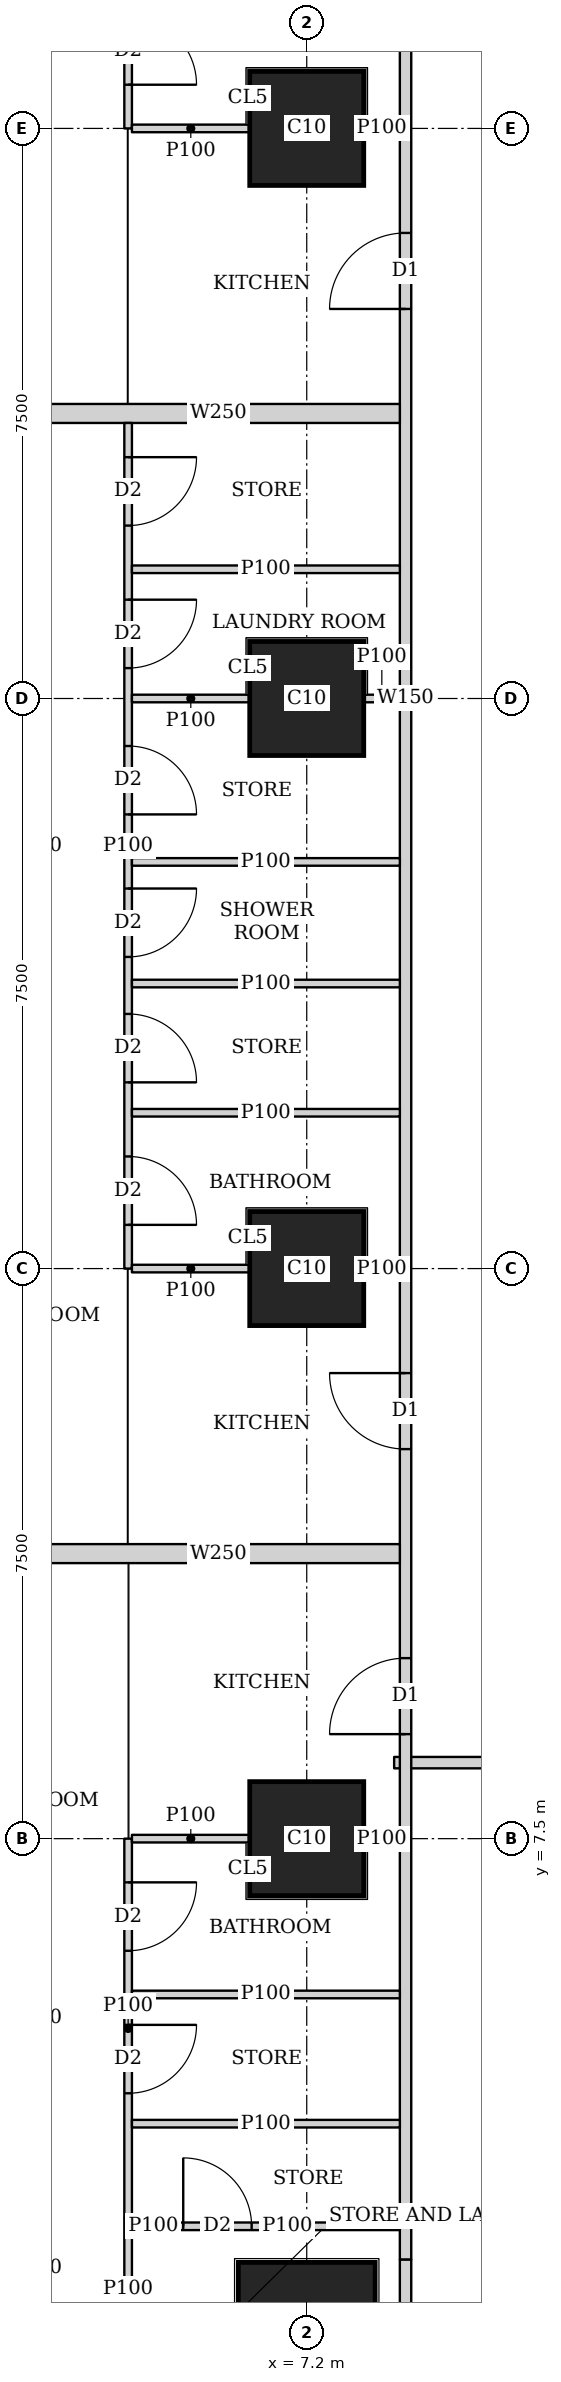
"""IFC4 building model, lengths in metres.
Left out: names, types, materials, properties, quantities, classifications, styles, units other than length and angle.
Written with IfcOpenShell. Run it as: python <this file> out.ifc"""

import sys

from ifc_helpers import new_model, si_unit, direction, frame, frame_2d, origin, origin_2d, place, context, subcontext, project, spatial, rectangle, extrude, element, fill, save


model = new_model("IFC4")
c1 = context("Model", 3, precision=1e-05, world=origin(), true_north=direction((0.0, 1.0)))
c2 = subcontext(c1, "Body", "Model", "MODEL_VIEW")
j1 = project(units=[si_unit("LENGTHUNIT", "METRE"), si_unit("PLANEANGLEUNIT", "RADIAN")], contexts=[c1])
p1 = place(None, origin())
s1 = spatial("IfcSite", under=j1, at=p1, CompositionType="ELEMENT")
p2 = place(p1, origin())
s2 = spatial("IfcBuilding", under=s1, at=p2, CompositionType="ELEMENT")
p3 = place(p2, frame((0.0, 0.0, 139.55)))
s3 = spatial("IfcBuildingStorey", under=s2, at=p3, CompositionType="ELEMENT", Elevation=139.55)
p4 = place(p3, frame((7.2, 1.025, 0.0), z_axis=(0.0, 0.0, 1.0), x_axis=(1.0, 0.0, 0.0)))
e1 = element("IfcColumn", 1, at=p4, inside=s3, PredefinedType="COLUMN", context=c2, shape_type="SweptSolid", body=[
    extrude(rectangle(XDim=1.8, YDim=1.8, at=origin_2d()), origin(), (0.0, 0.0, 1.0), 3.75),
])
for number, where, z_axis, x_axis in (
    (2, (7.2, 7.5, 0.0), (0.0, 0.0, 1.0), (1.0, 0.0, 0.0)),
    (3, (7.2, 15.0, 0.0), (0.0, 0.0, 1.0), (1.0, 0.0, 0.0)),
    (4, (7.2, 22.5, 0.0), (0.0, 0.0, 1.0), (1.0, 0.0, 0.0)),
    (5, (7.2, 30.0, 0.0), (0.0, 0.0, 1.0), (1.0, 0.0, 0.0)),
):
    element("IfcColumn", number, at=place(p3, frame(where, z_axis=z_axis, x_axis=x_axis)), inside=s3, PredefinedType="COLUMN", context=c2, shape_type="SweptSolid", body=[
        extrude(rectangle(XDim=1.5, YDim=1.5, at=origin_2d()), origin(), (0.0, 0.0, 1.0), 3.75),
    ])
p5 = place(p3, frame((8.5, 0.159, 0.0), z_axis=(0.0, 0.0, 1.0), x_axis=(0.0, 1.0, 0.0)))
e6 = element("IfcWall", 6, at=p5, inside=s3, PredefinedType="SOLIDWALL", context=c2, shape_type="SweptSolid", body=[
    extrude(rectangle(XDim=1.805, YDim=0.15, at=frame_2d((0.903, 0.0))), origin(), (0.0, 0.0, 1.0), 2.1),
])
p6 = place(p3, frame((8.5, 1.964, 0.0), z_axis=(0.0, 0.0, 1.0), x_axis=(0.0, 1.0, 0.0)))
e7 = element("IfcWall", 7, at=p6, inside=s3, PredefinedType="SOLIDWALL", context=c2, shape_type="SweptSolid", body=[
    extrude(rectangle(XDim=41.097, YDim=0.15, at=frame_2d((20.548, 0.0))), origin(), (0.0, 0.0, 1.0), 3.5),
])
p7 = place(p6, frame((6.911, 0.0, 0.0)))
e8 = element("IfcOpeningElement", 8, at=p7, cuts=e7, PredefinedType="OPENING", context=c2, shape_type="SweptSolid", body=[
    extrude(rectangle(XDim=1.0, YDim=2.1, at=frame_2d((0.5, 1.05))), frame((0.0, 0.085, 0.0), z_axis=(0.0, -1.0, 0.0), x_axis=(1.0, 0.0, 0.0)), (0.0, 0.0, 1.0), 0.17),
])
p8 = place(p6, frame((10.661, 0.0, 0.0)))
e9 = element("IfcOpeningElement", 9, at=p8, cuts=e7, PredefinedType="OPENING", context=c2, shape_type="SweptSolid", body=[
    extrude(rectangle(XDim=1.0, YDim=2.1, at=frame_2d((0.5, 1.05))), frame((0.0, 0.085, 0.0), z_axis=(0.0, -1.0, 0.0), x_axis=(1.0, 0.0, 0.0)), (0.0, 0.0, 1.0), 0.17),
])
p9 = place(p6, frame((25.661, 0.0, 0.0)))
e10 = element("IfcOpeningElement", 10, at=p9, cuts=e7, PredefinedType="OPENING", context=c2, shape_type="SweptSolid", body=[
    extrude(rectangle(XDim=1.0, YDim=2.1, at=frame_2d((0.5, 1.05))), frame((0.0, 0.085, 0.0), z_axis=(0.0, -1.0, 0.0), x_axis=(1.0, 0.0, 0.0)), (0.0, 0.0, 1.0), 0.17),
])
p10 = place(p6, frame((33.161, 0.0, 0.0)))
e11 = element("IfcOpeningElement", 11, at=p10, cuts=e7, PredefinedType="OPENING", context=c2, shape_type="SweptSolid", body=[
    extrude(rectangle(XDim=1.0, YDim=2.1, at=frame_2d((0.5, 1.05))), frame((0.0, 0.085, 0.0), z_axis=(0.0, -1.0, 0.0), x_axis=(1.0, 0.0, 0.0)), (0.0, 0.0, 1.0), 0.17),
])
p11 = place(p3, frame((40.053, 8.5, 0.0), z_axis=(0.0, 0.0, 1.0), x_axis=(-1.0, 0.0, 0.0)))
e12 = element("IfcWall", 12, at=p11, inside=s3, PredefinedType="SOLIDWALL", context=c2, shape_type="SweptSolid", body=[
    extrude(rectangle(XDim=31.703, YDim=0.15, at=frame_2d((15.852, 0.0))), origin(), (0.0, 0.0, 1.0), 3.5),
])
p12 = place(p11, frame((28.103, 0.0, 0.0)))
e13 = element("IfcOpeningElement", 13, at=p12, cuts=e12, PredefinedType="OPENING", context=c2, shape_type="SweptSolid", body=[
    extrude(rectangle(XDim=1.0, YDim=2.1, at=frame_2d((0.5, 1.05))), frame((0.0, 0.085, 0.0), z_axis=(0.0, -1.0, 0.0), x_axis=(1.0, 0.0, 0.0)), (0.0, 0.0, 1.0), 0.17),
])
p13 = place(p11, frame((19.853, 0.0, 0.0)))
e14 = element("IfcOpeningElement", 14, at=p13, cuts=e12, PredefinedType="OPENING", context=c2, shape_type="SweptSolid", body=[
    extrude(rectangle(XDim=1.0, YDim=2.1, at=frame_2d((0.5, 1.05))), frame((0.0, 0.085, 0.0), z_axis=(0.0, -1.0, 0.0), x_axis=(1.0, 0.0, 0.0)), (0.0, 0.0, 1.0), 0.17),
])
p14 = place(p11, frame((5.514, 0.0, 0.0)))
e15 = element("IfcOpeningElement", 15, at=p14, cuts=e12, PredefinedType="OPENING", context=c2, shape_type="SweptSolid", body=[
    extrude(rectangle(XDim=1.0, YDim=2.1, at=frame_2d((0.5, 1.05))), frame((0.0, 0.085, 0.0), z_axis=(0.0, -1.0, 0.0), x_axis=(1.0, 0.0, 0.0)), (0.0, 0.0, 1.0), 0.17),
])
p15 = place(p3, frame((4.85, 0.634, 0.0), z_axis=(0.0, 0.0, 1.0), x_axis=(0.0, 1.0, 0.0)))
e16 = element("IfcWall", 16, at=p15, inside=s3, PredefinedType="PARTITIONING", context=c2, shape_type="SweptSolid", body=[
    extrude(rectangle(XDim=1.871, YDim=0.1, at=frame_2d((0.936, 0.0))), origin(), (0.0, 0.0, 1.0), 2.1),
])
p16 = place(p3, frame((4.85, 2.505, 0.0), z_axis=(0.0, 0.0, 1.0), x_axis=(0.0, 1.0, 0.0)))
e17 = element("IfcWall", 17, at=p16, inside=s3, PredefinedType="PARTITIONING", context=c2, shape_type="SweptSolid", body=[
    extrude(rectangle(XDim=4.995, YDim=0.1, at=frame_2d((2.498, 0.0))), origin(), (0.0, 0.0, 1.0), 3.5),
])
p17 = place(p16, frame((3.52, 0.0, 0.0)))
e18 = element("IfcOpeningElement", 18, at=p17, cuts=e17, PredefinedType="OPENING", context=c2, shape_type="SweptSolid", body=[
    extrude(rectangle(XDim=0.9, YDim=2.1, at=frame_2d((0.45, 1.05))), frame((0.0, 0.06, 0.0), z_axis=(0.0, -1.0, 0.0), x_axis=(1.0, 0.0, 0.0)), (0.0, 0.0, 1.0), 0.12),
])
p18 = place(p16, frame((1.645, 0.0, 0.0)))
e19 = element("IfcOpeningElement", 19, at=p18, cuts=e17, PredefinedType="OPENING", context=c2, shape_type="SweptSolid", body=[
    extrude(rectangle(XDim=0.9, YDim=2.1, at=frame_2d((0.45, 1.05))), frame((0.0, 0.06, 0.0), z_axis=(0.0, -1.0, 0.0), x_axis=(1.0, 0.0, 0.0)), (0.0, 0.0, 1.0), 0.12),
])
p19 = place(p3, frame((4.9, 3.75, 0.0), z_axis=(0.0, 0.0, 1.0), x_axis=(1.0, 0.0, 0.0)))
e20 = element("IfcWall", 20, at=p19, inside=s3, PredefinedType="PARTITIONING", context=c2, shape_type="SweptSolid", body=[
    extrude(rectangle(XDim=3.525, YDim=0.1, at=frame_2d((1.763, 0.0))), origin(), (0.0, 0.0, 1.0), 3.5),
])
p20 = place(p3, frame((4.9, 7.5, 0.0), z_axis=(0.0, 0.0, 1.0), x_axis=(1.0, 0.0, 0.0)))
e21 = element("IfcWall", 21, at=p20, inside=s3, PredefinedType="PARTITIONING", context=c2, shape_type="SweptSolid", body=[
    extrude(rectangle(XDim=1.549, YDim=0.1, at=frame_2d((0.774, 0.0))), origin(), (0.0, 0.0, 1.0), 3.5),
])
p21 = place(p3, frame((7.951, 7.5, 0.0), z_axis=(0.0, 0.0, 1.0), x_axis=(1.0, 0.0, 0.0)))
e22 = element("IfcWall", 22, at=p21, inside=s3, PredefinedType="PARTITIONING", context=c2, shape_type="SweptSolid", body=[
    extrude(rectangle(XDim=0.474, YDim=0.1, at=frame_2d((0.237, 0.0))), origin(), (0.0, 0.0, 1.0), 3.5),
])
p22 = place(p3, frame((4.9, 5.45, 0.0), z_axis=(0.0, 0.0, 1.0), x_axis=(1.0, 0.0, 0.0)))
e23 = element("IfcWall", 23, at=p22, inside=s3, PredefinedType="PARTITIONING", context=c2, shape_type="SweptSolid", body=[
    extrude(rectangle(XDim=3.525, YDim=0.1, at=frame_2d((1.763, 0.0))), origin(), (0.0, 0.0, 1.0), 3.5),
])
p23 = place(p3, frame((4.85, 15.0, 0.0), z_axis=(0.0, 0.0, 1.0), x_axis=(0.0, 1.0, 0.0)))
e24 = element("IfcWall", 24, at=p23, inside=s3, PredefinedType="PARTITIONING", context=c2, shape_type="SweptSolid", body=[
    extrude(rectangle(XDim=11.125, YDim=0.1, at=frame_2d((5.562, 0.0))), origin(), (0.0, 0.0, 1.0), 3.5),
])
p24 = place(p23, frame((0.575, 0.0, 0.0)))
e25 = element("IfcOpeningElement", 25, at=p24, cuts=e24, PredefinedType="OPENING", context=c2, shape_type="SweptSolid", body=[
    extrude(rectangle(XDim=0.9, YDim=2.1, at=frame_2d((0.45, 1.05))), frame((0.0, 0.06, 0.0), z_axis=(0.0, -1.0, 0.0), x_axis=(1.0, 0.0, 0.0)), (0.0, 0.0, 1.0), 0.12),
])
p25 = place(p23, frame((4.1, 0.0, 0.0)))
e26 = element("IfcOpeningElement", 26, at=p25, cuts=e24, PredefinedType="OPENING", context=c2, shape_type="SweptSolid", body=[
    extrude(rectangle(XDim=0.9, YDim=2.1, at=frame_2d((0.45, 1.05))), frame((0.0, 0.06, 0.0), z_axis=(0.0, -1.0, 0.0), x_axis=(1.0, 0.0, 0.0)), (0.0, 0.0, 1.0), 0.12),
])
p26 = place(p23, frame((7.9, 0.0, 0.0)))
e27 = element("IfcOpeningElement", 27, at=p26, cuts=e24, PredefinedType="OPENING", context=c2, shape_type="SweptSolid", body=[
    extrude(rectangle(XDim=0.9, YDim=2.1, at=frame_2d((0.45, 1.05))), frame((0.0, 0.06, 0.0), z_axis=(0.0, -1.0, 0.0), x_axis=(1.0, 0.0, 0.0)), (0.0, 0.0, 1.0), 0.12),
])
p27 = place(p23, frame((2.45, 0.0, 0.0)))
e28 = element("IfcOpeningElement", 28, at=p27, cuts=e24, PredefinedType="OPENING", context=c2, shape_type="SweptSolid", body=[
    extrude(rectangle(XDim=0.9, YDim=2.1, at=frame_2d((0.45, 1.05))), frame((0.0, 0.06, 0.0), z_axis=(0.0, -1.0, 0.0), x_axis=(1.0, 0.0, 0.0)), (0.0, 0.0, 1.0), 0.12),
])
p28 = place(p23, frame((5.975, 0.0, 0.0)))
e29 = element("IfcOpeningElement", 29, at=p28, cuts=e24, PredefinedType="OPENING", context=c2, shape_type="SweptSolid", body=[
    extrude(rectangle(XDim=0.9, YDim=2.1, at=frame_2d((0.45, 1.05))), frame((0.0, 0.06, 0.0), z_axis=(0.0, -1.0, 0.0), x_axis=(1.0, 0.0, 0.0)), (0.0, 0.0, 1.0), 0.12),
])
p29 = place(p23, frame((9.775, 0.0, 0.0)))
e30 = element("IfcOpeningElement", 30, at=p29, cuts=e24, PredefinedType="OPENING", context=c2, shape_type="SweptSolid", body=[
    extrude(rectangle(XDim=0.9, YDim=2.1, at=frame_2d((0.45, 1.05))), frame((0.0, 0.06, 0.0), z_axis=(0.0, -1.0, 0.0), x_axis=(1.0, 0.0, 0.0)), (0.0, 0.0, 1.0), 0.12),
])
p30 = place(p3, frame((4.9, 15.0, 0.0), z_axis=(0.0, 0.0, 1.0), x_axis=(1.0, 0.0, 0.0)))
e31 = element("IfcWall", 31, at=p30, inside=s3, PredefinedType="PARTITIONING", context=c2, shape_type="SweptSolid", body=[
    extrude(rectangle(XDim=1.549, YDim=0.1, at=frame_2d((0.774, 0.0))), origin(), (0.0, 0.0, 1.0), 3.5),
])
p31 = place(p3, frame((7.951, 15.0, 0.0), z_axis=(0.0, 0.0, 1.0), x_axis=(1.0, 0.0, 0.0)))
e32 = element("IfcWall", 32, at=p31, inside=s3, PredefinedType="PARTITIONING", context=c2, shape_type="SweptSolid", body=[
    extrude(rectangle(XDim=0.474, YDim=0.1, at=frame_2d((0.237, 0.0))), origin(), (0.0, 0.0, 1.0), 3.5),
])
p32 = place(p3, frame((4.9, 18.75, 0.0), z_axis=(0.0, 0.0, 1.0), x_axis=(1.0, 0.0, 0.0)))
e33 = element("IfcWall", 33, at=p32, inside=s3, PredefinedType="PARTITIONING", context=c2, shape_type="SweptSolid", body=[
    extrude(rectangle(XDim=3.525, YDim=0.1, at=frame_2d((1.763, 0.0))), origin(), (0.0, 0.0, 1.0), 3.5),
])
p33 = place(p3, frame((4.9, 22.5, 0.0), z_axis=(0.0, 0.0, 1.0), x_axis=(1.0, 0.0, 0.0)))
e34 = element("IfcWall", 34, at=p33, inside=s3, PredefinedType="PARTITIONING", context=c2, shape_type="SweptSolid", body=[
    extrude(rectangle(XDim=1.549, YDim=0.1, at=frame_2d((0.774, 0.0))), origin(), (0.0, 0.0, 1.0), 3.5),
])
p34 = place(p3, frame((7.951, 22.5, 0.0), z_axis=(0.0, 0.0, 1.0), x_axis=(1.0, 0.0, 0.0)))
e35 = element("IfcWall", 35, at=p34, inside=s3, PredefinedType="PARTITIONING", context=c2, shape_type="SweptSolid", body=[
    extrude(rectangle(XDim=0.474, YDim=0.1, at=frame_2d((0.237, 0.0))), origin(), (0.0, 0.0, 1.0), 3.5),
])
for number, where, z_axis, x_axis in (
    (36, (4.9, 17.05, 0.0), (0.0, 0.0, 1.0), (1.0, 0.0, 0.0)),
    (37, (4.9, 20.35, 0.0), (0.0, 0.0, 1.0), (1.0, 0.0, 0.0)),
    (38, (4.9, 24.2, 0.0), (0.0, 0.0, 1.0), (1.0, 0.0, 0.0)),
):
    element("IfcWall", number, at=place(p3, frame(where, z_axis=z_axis, x_axis=x_axis)), inside=s3, PredefinedType="PARTITIONING", context=c2, shape_type="SweptSolid", body=[
        extrude(rectangle(XDim=3.525, YDim=0.1, at=frame_2d((1.763, 0.0))), origin(), (0.0, 0.0, 1.0), 3.5),
    ])
p35 = place(p3, frame((3.65, 11.25, 0.0), z_axis=(0.0, 0.0, 1.0), x_axis=(1.0, 0.0, 0.0)))
e39 = element("IfcWall", 39, at=p35, inside=s3, PredefinedType="SOLIDWALL", context=c2, shape_type="SweptSolid", body=[
    extrude(rectangle(XDim=4.775, YDim=0.25, at=frame_2d((2.388, 0.0))), origin(), (0.0, 0.0, 1.0), 3.5),
])
p36 = place(p3, frame((4.85, 30.0, 0.0), z_axis=(0.0, 0.0, 1.0), x_axis=(0.0, 1.0, 0.0)))
e40 = element("IfcWall", 40, at=p36, inside=s3, PredefinedType="PARTITIONING", context=c2, shape_type="SweptSolid", body=[
    extrude(rectangle(XDim=3.625, YDim=0.1, at=frame_2d((1.812, 0.0))), origin(), (0.0, 0.0, 1.0), 3.5),
])
p37 = place(p36, frame((0.575, 0.0, 0.0)))
e41 = element("IfcOpeningElement", 41, at=p37, cuts=e40, PredefinedType="OPENING", context=c2, shape_type="SweptSolid", body=[
    extrude(rectangle(XDim=0.9, YDim=2.1, at=frame_2d((0.45, 1.05))), frame((0.0, 0.06, 0.0), z_axis=(0.0, -1.0, 0.0), x_axis=(1.0, 0.0, 0.0)), (0.0, 0.0, 1.0), 0.12),
])
p38 = place(p36, frame((2.45, 0.0, 0.0)))
e42 = element("IfcOpeningElement", 42, at=p38, cuts=e40, PredefinedType="OPENING", context=c2, shape_type="SweptSolid", body=[
    extrude(rectangle(XDim=0.9, YDim=2.1, at=frame_2d((0.45, 1.05))), frame((0.0, 0.06, 0.0), z_axis=(0.0, -1.0, 0.0), x_axis=(1.0, 0.0, 0.0)), (0.0, 0.0, 1.0), 0.12),
])
p39 = place(p3, frame((4.9, 30.0, 0.0), z_axis=(0.0, 0.0, 1.0), x_axis=(1.0, 0.0, 0.0)))
e43 = element("IfcWall", 43, at=p39, inside=s3, PredefinedType="PARTITIONING", context=c2, shape_type="SweptSolid", body=[
    extrude(rectangle(XDim=1.549, YDim=0.1, at=frame_2d((0.774, 0.0))), origin(), (0.0, 0.0, 1.0), 3.5),
])
p40 = place(p3, frame((7.951, 30.0, 0.0), z_axis=(0.0, 0.0, 1.0), x_axis=(1.0, 0.0, 0.0)))
e44 = element("IfcWall", 44, at=p40, inside=s3, PredefinedType="PARTITIONING", context=c2, shape_type="SweptSolid", body=[
    extrude(rectangle(XDim=0.474, YDim=0.1, at=frame_2d((0.237, 0.0))), origin(), (0.0, 0.0, 1.0), 3.5),
])
p41 = place(p3, frame((3.65, 26.25, 0.0), z_axis=(0.0, 0.0, 1.0), x_axis=(1.0, 0.0, 0.0)))
e45 = element("IfcWall", 45, at=p41, inside=s3, PredefinedType="SOLIDWALL", context=c2, shape_type="SweptSolid", body=[
    extrude(rectangle(XDim=4.775, YDim=0.25, at=frame_2d((2.388, 0.0))), origin(), (0.0, 0.0, 1.0), 3.5),
])
p42 = place(p3, frame((5.467, 2.4, 0.0), z_axis=(0.0, 0.0, 1.0), x_axis=(1.0, 0.0, 0.0)))
e46 = element("IfcWall", 46, at=p42, inside=s3, PredefinedType="PARTITIONING", context=c2, shape_type="SweptSolid", body=[
    extrude(rectangle(XDim=2.958, YDim=0.1, at=frame_2d((1.479, 0.0))), origin(), (0.0, 0.0, 1.0), 3.5),
])
p43 = place(p42, frame((0.108, 0.0, 0.0)))
e47 = element("IfcOpeningElement", 47, at=p43, cuts=e46, PredefinedType="OPENING", context=c2, shape_type="SweptSolid", body=[
    extrude(rectangle(XDim=0.9, YDim=2.1, at=frame_2d((0.45, 1.05))), frame((0.0, 0.06, 0.0), z_axis=(0.0, -1.0, 0.0), x_axis=(1.0, 0.0, 0.0)), (0.0, 0.0, 1.0), 0.12),
])
p44 = place(p3, frame((5.467, 2.4, 0.0), z_axis=(0.0, 0.0, 1.0), x_axis=(-1.0, 0.0, 0.0)))
e48 = element("IfcWall", 48, at=p44, inside=s3, PredefinedType="PARTITIONING", context=c2, shape_type="SweptSolid", body=[
    extrude(rectangle(XDim=0.567, YDim=0.1, at=frame_2d((0.284, 0.0))), origin(), (0.0, 0.0, 1.0), 2.1),
])
p45 = place(p17, origin())
e49 = element("IfcDoor", 49, at=p45, inside=s3, OperationType="SINGLE_SWING_LEFT", PredefinedType="DOOR", context=c2, shape_type="SweptSolid", body=[
    extrude(rectangle(XDim=0.9, YDim=2.1, at=frame_2d((0.45, 1.05))), frame((0.0, 0.025, 0.0), z_axis=(0.0, -1.0, 0.0), x_axis=(1.0, 0.0, 0.0)), (0.0, 0.0, 1.0), 0.05),
])
fill(e18, e49)
p46 = place(p18, origin())
e50 = element("IfcDoor", 50, at=p46, inside=s3, OperationType="SINGLE_SWING_LEFT", PredefinedType="DOOR", context=c2, shape_type="SweptSolid", body=[
    extrude(rectangle(XDim=0.9, YDim=2.1, at=frame_2d((0.45, 1.05))), frame((0.0, 0.025, 0.0), z_axis=(0.0, -1.0, 0.0), x_axis=(1.0, 0.0, 0.0)), (0.0, 0.0, 1.0), 0.05),
])
fill(e19, e50)
p47 = place(p7, origin())
e51 = element("IfcDoor", 51, at=p47, inside=s3, OperationType="SINGLE_SWING_LEFT", PredefinedType="DOOR", context=c2, shape_type="SweptSolid", body=[
    extrude(rectangle(XDim=1.0, YDim=2.1, at=frame_2d((0.5, 1.05))), frame((0.0, 0.025, 0.0), z_axis=(0.0, -1.0, 0.0), x_axis=(1.0, 0.0, 0.0)), (0.0, 0.0, 1.0), 0.05),
])
fill(e8, e51)
p48 = place(p24, origin())
e52 = element("IfcDoor", 52, at=p48, inside=s3, OperationType="SINGLE_SWING_RIGHT", PredefinedType="DOOR", context=c2, shape_type="SweptSolid", body=[
    extrude(rectangle(XDim=0.9, YDim=2.1, at=frame_2d((0.45, 1.05))), frame((0.0, 0.025, 0.0), z_axis=(0.0, -1.0, 0.0), x_axis=(1.0, 0.0, 0.0)), (0.0, 0.0, 1.0), 0.05),
])
fill(e25, e52)
p49 = place(p25, origin())
e53 = element("IfcDoor", 53, at=p49, inside=s3, OperationType="SINGLE_SWING_LEFT", PredefinedType="DOOR", context=c2, shape_type="SweptSolid", body=[
    extrude(rectangle(XDim=0.9, YDim=2.1, at=frame_2d((0.45, 1.05))), frame((0.0, 0.025, 0.0), z_axis=(0.0, -1.0, 0.0), x_axis=(1.0, 0.0, 0.0)), (0.0, 0.0, 1.0), 0.05),
])
fill(e26, e53)
p50 = place(p26, origin())
e54 = element("IfcDoor", 54, at=p50, inside=s3, OperationType="SINGLE_SWING_LEFT", PredefinedType="DOOR", context=c2, shape_type="SweptSolid", body=[
    extrude(rectangle(XDim=0.9, YDim=2.1, at=frame_2d((0.45, 1.05))), frame((0.0, 0.025, 0.0), z_axis=(0.0, -1.0, 0.0), x_axis=(1.0, 0.0, 0.0)), (0.0, 0.0, 1.0), 0.05),
])
fill(e27, e54)
p51 = place(p27, origin())
e55 = element("IfcDoor", 55, at=p51, inside=s3, OperationType="SINGLE_SWING_RIGHT", PredefinedType="DOOR", context=c2, shape_type="SweptSolid", body=[
    extrude(rectangle(XDim=0.9, YDim=2.1, at=frame_2d((0.45, 1.05))), frame((0.0, 0.025, 0.0), z_axis=(0.0, -1.0, 0.0), x_axis=(1.0, 0.0, 0.0)), (0.0, 0.0, 1.0), 0.05),
])
fill(e28, e55)
p52 = place(p28, origin())
e56 = element("IfcDoor", 56, at=p52, inside=s3, OperationType="SINGLE_SWING_RIGHT", PredefinedType="DOOR", context=c2, shape_type="SweptSolid", body=[
    extrude(rectangle(XDim=0.9, YDim=2.1, at=frame_2d((0.45, 1.05))), frame((0.0, 0.025, 0.0), z_axis=(0.0, -1.0, 0.0), x_axis=(1.0, 0.0, 0.0)), (0.0, 0.0, 1.0), 0.05),
])
fill(e29, e56)
p53 = place(p29, origin())
e57 = element("IfcDoor", 57, at=p53, inside=s3, OperationType="SINGLE_SWING_LEFT", PredefinedType="DOOR", context=c2, shape_type="SweptSolid", body=[
    extrude(rectangle(XDim=0.9, YDim=2.1, at=frame_2d((0.45, 1.05))), frame((0.0, 0.025, 0.0), z_axis=(0.0, -1.0, 0.0), x_axis=(1.0, 0.0, 0.0)), (0.0, 0.0, 1.0), 0.05),
])
fill(e30, e57)
p54 = place(p8, origin())
e58 = element("IfcDoor", 58, at=p54, inside=s3, OperationType="SINGLE_SWING_RIGHT", PredefinedType="DOOR", context=c2, shape_type="SweptSolid", body=[
    extrude(rectangle(XDim=1.0, YDim=2.1, at=frame_2d((0.5, 1.05))), frame((0.0, 0.025, 0.0), z_axis=(0.0, -1.0, 0.0), x_axis=(1.0, 0.0, 0.0)), (0.0, 0.0, 1.0), 0.05),
])
fill(e9, e58)
p55 = place(p37, origin())
e59 = element("IfcDoor", 59, at=p55, inside=s3, OperationType="SINGLE_SWING_RIGHT", PredefinedType="DOOR", context=c2, shape_type="SweptSolid", body=[
    extrude(rectangle(XDim=0.9, YDim=2.1, at=frame_2d((0.45, 1.05))), frame((0.0, 0.025, 0.0), z_axis=(0.0, -1.0, 0.0), x_axis=(1.0, 0.0, 0.0)), (0.0, 0.0, 1.0), 0.05),
])
fill(e41, e59)
p56 = place(p9, origin())
e60 = element("IfcDoor", 60, at=p56, inside=s3, OperationType="SINGLE_SWING_LEFT", PredefinedType="DOOR", context=c2, shape_type="SweptSolid", body=[
    extrude(rectangle(XDim=1.0, YDim=2.1, at=frame_2d((0.5, 1.05))), frame((0.0, 0.025, 0.0), z_axis=(0.0, -1.0, 0.0), x_axis=(1.0, 0.0, 0.0)), (0.0, 0.0, 1.0), 0.05),
])
fill(e10, e60)
p57 = place(p43, origin())
e61 = element("IfcDoor", 61, at=p57, inside=s3, OperationType="SINGLE_SWING_LEFT", PredefinedType="DOOR", context=c2, shape_type="SweptSolid", body=[
    extrude(rectangle(XDim=0.9, YDim=2.1, at=frame_2d((0.45, 1.05))), frame((0.0, 0.025, 0.0), z_axis=(0.0, -1.0, 0.0), x_axis=(1.0, 0.0, 0.0)), (0.0, 0.0, 1.0), 0.05),
])
fill(e47, e61)
save(model, sys.argv[1])
